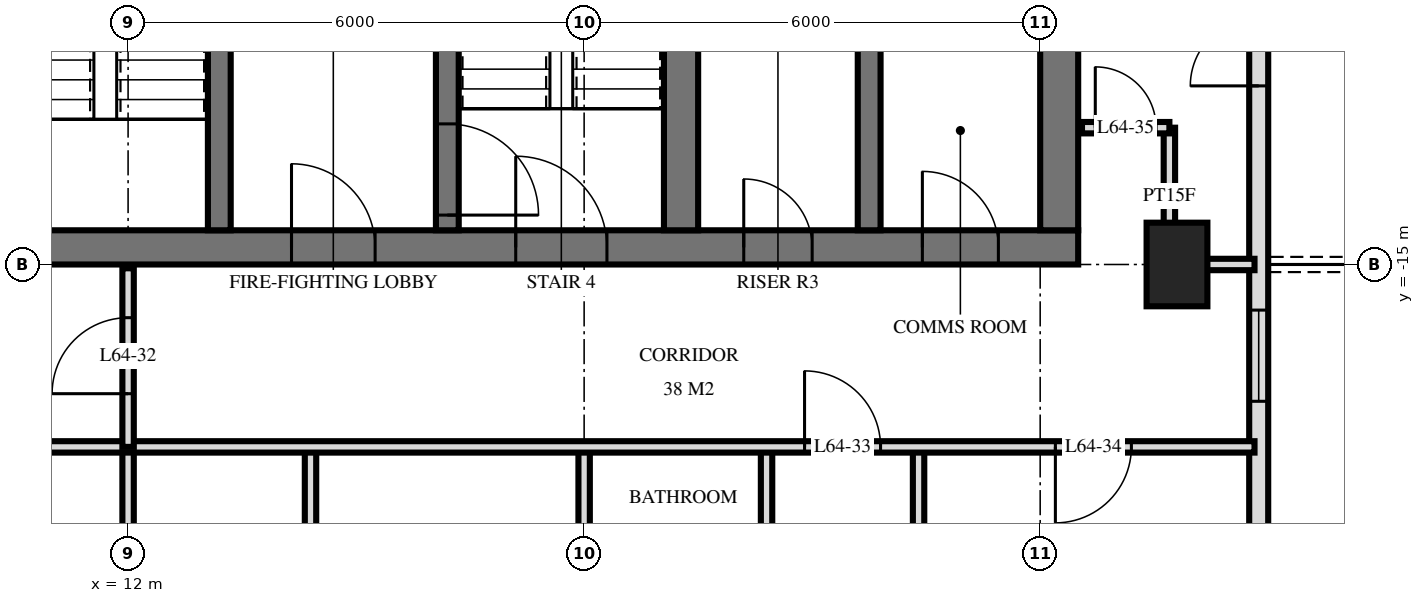
"""IFC4 building model, lengths in metres.
Left out: names, types, materials, properties, quantities, classifications, styles, units other than length and angle.
Written with IfcOpenShell. Run it as: python <this file> out.ifc"""

import sys

from ifc_helpers import new_model, si_unit, direction, frame, frame_2d, origin, origin_2d, place, context, subcontext, project, spatial, rectangle, extrude, element, fill, save


model = new_model("IFC4")
c1 = context("Model", 3, precision=1e-05, world=origin(), true_north=direction((0.0, 1.0)))
c2 = subcontext(c1, "Body", "Model", "MODEL_VIEW")
j1 = project(units=[si_unit("LENGTHUNIT", "METRE"), si_unit("PLANEANGLEUNIT", "RADIAN")], contexts=[c1])
p1 = place(None, origin())
s1 = spatial("IfcSite", under=j1, at=p1, CompositionType="ELEMENT")
p2 = place(p1, origin())
s2 = spatial("IfcBuilding", under=s1, at=p2, CompositionType="ELEMENT")
p3 = place(p2, frame((0.0, 0.0, 243.1)))
s3 = spatial("IfcBuildingStorey", under=s2, at=p3, CompositionType="ELEMENT", Elevation=243.1)
p4 = place(p3, frame((25.8, -15.0, 0.0), z_axis=(0.0, 0.0, 1.0), x_axis=(0.0, 1.0, 0.0)))
e1 = element("IfcColumn", 1, at=p4, inside=s3, PredefinedType="COLUMN", context=c2, shape_type="SweptSolid", body=[
    extrude(rectangle(XDim=1.1, YDim=0.8, at=origin_2d()), origin(), (0.0, 0.0, 1.0), 3.5),
])
p5 = place(p3, frame((10.0, -14.775, 0.0), z_axis=(0.0, 0.0, 1.0), x_axis=(1.0, 0.0, 0.0)))
e2 = element("IfcWall", 2, at=p5, inside=s3, PredefinedType="SHEAR", context=c2, shape_type="SweptSolid", body=[
    extrude(rectangle(XDim=14.5, YDim=0.45, at=frame_2d((7.25, 0.0))), origin(), (0.0, 0.0, 1.0), 3.5),
])
p6 = place(p5, frame((7.1, 0.0, 0.0)))
e3 = element("IfcOpeningElement", 3, at=p6, cuts=e2, PredefinedType="OPENING", context=c2, shape_type="SweptSolid", body=[
    extrude(rectangle(XDim=1.2, YDim=2.1, at=frame_2d((0.6, 1.05))), frame((0.0, 0.235, 0.0), z_axis=(0.0, -1.0, 0.0), x_axis=(1.0, 0.0, 0.0)), (0.0, 0.0, 1.0), 0.47),
])
p7 = place(p5, frame((4.15, 0.0, 0.0)))
e4 = element("IfcOpeningElement", 4, at=p7, cuts=e2, PredefinedType="OPENING", context=c2, shape_type="SweptSolid", body=[
    extrude(rectangle(XDim=1.1, YDim=2.1, at=frame_2d((0.55, 1.05))), frame((0.0, 0.235, 0.0), z_axis=(0.0, -1.0, 0.0), x_axis=(1.0, 0.0, 0.0)), (0.0, 0.0, 1.0), 0.47),
])
p8 = place(p5, frame((10.1, 0.0, 0.0)))
e5 = element("IfcOpeningElement", 5, at=p8, cuts=e2, PredefinedType="OPENING", context=c2, shape_type="SweptSolid", body=[
    extrude(rectangle(XDim=0.9, YDim=2.1, at=frame_2d((0.45, 1.05))), frame((0.0, 0.235, 0.0), z_axis=(0.0, -1.0, 0.0), x_axis=(1.0, 0.0, 0.0)), (0.0, 0.0, 1.0), 0.47),
])
p9 = place(p5, frame((12.45, 0.0, 0.0)))
e6 = element("IfcOpeningElement", 6, at=p9, cuts=e2, PredefinedType="OPENING", context=c2, shape_type="SweptSolid", body=[
    extrude(rectangle(XDim=1.0, YDim=2.1, at=frame_2d((0.5, 1.05))), frame((0.0, 0.235, 0.0), z_axis=(0.0, -1.0, 0.0), x_axis=(1.0, 0.0, 0.0)), (0.0, 0.0, 1.0), 0.47),
])
p10 = place(p3, frame((24.25, -14.55, 0.0), z_axis=(0.0, 0.0, 1.0), x_axis=(0.0, 1.0, 0.0)))
e7 = element("IfcWall", 7, at=p10, inside=s3, PredefinedType="SHEAR", context=c2, shape_type="SweptSolid", body=[
    extrude(rectangle(XDim=14.1, YDim=0.5, at=frame_2d((7.05, 0.0))), origin(), (0.0, 0.0, 1.0), 3.5),
])
p11 = place(p3, frame((13.2, -14.55, 0.0), z_axis=(0.0, 0.0, 1.0), x_axis=(0.0, 1.0, 0.0)))
e8 = element("IfcWall", 8, at=p11, inside=s3, PredefinedType="SHEAR", context=c2, shape_type="SweptSolid", body=[
    extrude(rectangle(XDim=5.4, YDim=0.3, at=frame_2d((2.7, 0.0))), origin(), (0.0, 0.0, 1.0), 3.5),
])
p12 = place(p11, frame((4.0, 0.0, 0.0)))
e9 = element("IfcOpeningElement", 9, at=p12, cuts=e8, PredefinedType="OPENING", context=c2, shape_type="SweptSolid", body=[
    extrude(rectangle(XDim=1.2, YDim=2.1, at=frame_2d((0.6, 1.05))), frame((0.0, 0.16, 0.0), z_axis=(0.0, -1.0, 0.0), x_axis=(1.0, 0.0, 0.0)), (0.0, 0.0, 1.0), 0.32),
])
p13 = place(p3, frame((16.2, -14.55, 0.0), z_axis=(0.0, 0.0, 1.0), x_axis=(0.0, 1.0, 0.0)))
e10 = element("IfcWall", 10, at=p13, inside=s3, PredefinedType="SHEAR", context=c2, shape_type="SweptSolid", body=[
    extrude(rectangle(XDim=5.4, YDim=0.3, at=frame_2d((2.7, 0.0))), origin(), (0.0, 0.0, 1.0), 3.5),
])
p14 = place(p13, frame((0.2, 0.0, 0.0)))
e11 = element("IfcOpeningElement", 11, at=p14, cuts=e10, PredefinedType="OPENING", context=c2, shape_type="SweptSolid", body=[
    extrude(rectangle(XDim=1.2, YDim=2.1, at=frame_2d((0.6, 1.05))), frame((0.0, 0.16, 0.0), z_axis=(0.0, -1.0, 0.0), x_axis=(1.0, 0.0, 0.0)), (0.0, 0.0, 1.0), 0.32),
])
p15 = place(p3, frame((19.275, -14.55, 0.0), z_axis=(0.0, 0.0, 1.0), x_axis=(0.0, 1.0, 0.0)))
e12 = element("IfcWall", 12, at=p15, inside=s3, PredefinedType="SHEAR", context=c2, shape_type="SweptSolid", body=[
    extrude(rectangle(XDim=5.4, YDim=0.45, at=frame_2d((2.7, 0.0))), origin(), (0.0, 0.0, 1.0), 3.5),
])
p16 = place(p3, frame((21.75, -14.55, 0.0), z_axis=(0.0, 0.0, 1.0), x_axis=(0.0, 1.0, 0.0)))
e13 = element("IfcWall", 13, at=p16, inside=s3, PredefinedType="SHEAR", context=c2, shape_type="SweptSolid", body=[
    extrude(rectangle(XDim=5.4, YDim=0.3, at=frame_2d((2.7, 0.0))), origin(), (0.0, 0.0, 1.0), 3.5),
])
p17 = place(p3, frame((26.875, -24.875, 0.0), z_axis=(0.0, 0.0, 1.0), x_axis=(0.0, 1.0, 0.0)))
e14 = element("IfcWall", 14, at=p17, inside=s3, PredefinedType="SOLIDWALL", context=c2, shape_type="SweptSolid", body=[
    extrude(rectangle(XDim=21.551, YDim=0.25, at=frame_2d((10.775, 0.0))), origin(), (0.0, 0.0, 1.0), 3.2),
])
p18 = place(p17, frame((0.575, 0.0, 0.0)))
e15 = element("IfcOpeningElement", 15, at=p18, cuts=e14, PredefinedType="OPENING", context=c2, shape_type="SweptSolid", body=[
    extrude(rectangle(XDim=1.8, YDim=2.4, at=frame_2d((0.9, 1.2))), frame((0.0, 0.135, 0.0), z_axis=(0.0, -1.0, 0.0), x_axis=(1.0, 0.0, 0.0)), (0.0, 0.0, 1.0), 0.27),
])
p19 = place(p17, frame((4.475, 0.0, 0.0)))
e16 = element("IfcOpeningElement", 16, at=p19, cuts=e14, PredefinedType="OPENING", context=c2, shape_type="SweptSolid", body=[
    extrude(rectangle(XDim=1.8, YDim=2.4, at=frame_2d((0.9, 1.2))), frame((0.0, 0.135, 0.0), z_axis=(0.0, -1.0, 0.0), x_axis=(1.0, 0.0, 0.0)), (0.0, 0.0, 1.0), 0.27),
])
p20 = place(p17, frame((8.075, 0.0, 0.9)))
e17 = element("IfcOpeningElement", 17, at=p20, cuts=e14, PredefinedType="OPENING", context=c2, shape_type="SweptSolid", body=[
    extrude(rectangle(XDim=1.2, YDim=1.5, at=frame_2d((0.6, 0.75))), frame((0.0, 0.135, 0.0), z_axis=(0.0, -1.0, 0.0), x_axis=(1.0, 0.0, 0.0)), (0.0, 0.0, 1.0), 0.27),
])
p21 = place(p17, frame((12.225, 0.0, 0.0)))
e18 = element("IfcOpeningElement", 18, at=p21, cuts=e14, PredefinedType="OPENING", context=c2, shape_type="SweptSolid", body=[
    extrude(rectangle(XDim=1.8, YDim=2.4, at=frame_2d((0.9, 1.2))), frame((0.0, 0.135, 0.0), z_axis=(0.0, -1.0, 0.0), x_axis=(1.0, 0.0, 0.0)), (0.0, 0.0, 1.0), 0.27),
])
p22 = place(p3, frame((25.7, -15.0, 0.0), z_axis=(0.0, 0.0, 1.0), x_axis=(0.0, 1.0, 0.0)))
e19 = element("IfcWall", 19, at=p22, inside=s3, PredefinedType="PARTITIONING", context=c2, shape_type="SweptSolid", body=[
    extrude(rectangle(XDim=1.8, YDim=0.15, at=frame_2d((0.9, 0.0))), origin(), (0.0, 0.0, 1.0), 3.22),
])
p23 = place(p3, frame((22.4, -21.6, 0.0), z_axis=(0.0, 0.0, 1.0), x_axis=(0.0, 1.0, 0.0)))
e20 = element("IfcWall", 20, at=p23, inside=s3, PredefinedType="PARTITIONING", context=c2, shape_type="SweptSolid", body=[
    extrude(rectangle(XDim=4.2, YDim=0.15, at=frame_2d((2.1, 0.0))), origin(), (0.0, 0.0, 1.0), 3.22),
])
p24 = place(p3, frame((20.4, -21.6, 0.0), z_axis=(0.0, 0.0, 1.0), x_axis=(0.0, 1.0, 0.0)))
e21 = element("IfcWall", 21, at=p24, inside=s3, PredefinedType="PARTITIONING", context=c2, shape_type="SweptSolid", body=[
    extrude(rectangle(XDim=4.2, YDim=0.15, at=frame_2d((2.1, 0.0))), origin(), (0.0, 0.0, 1.0), 3.22),
])
p25 = place(p24, frame((1.6, 0.0, 0.0)))
e22 = element("IfcOpeningElement", 22, at=p25, cuts=e21, PredefinedType="OPENING", context=c2, shape_type="SweptSolid", body=[
    extrude(rectangle(XDim=1.0, YDim=2.1, at=frame_2d((0.5, 1.05))), frame((0.0, 0.085, 0.0), z_axis=(0.0, -1.0, 0.0), x_axis=(1.0, 0.0, 0.0)), (0.0, 0.0, 1.0), 0.17),
])
for number, where, z_axis, x_axis in (
    (23, (18.0, -21.6, 0.0), (0.0, 0.0, 1.0), (0.0, 1.0, 0.0)),
    (24, (14.4, -21.6, 0.0), (0.0, 0.0, 1.0), (0.0, 1.0, 0.0)),
):
    element("IfcWall", number, at=place(p3, frame(where, z_axis=z_axis, x_axis=x_axis)), inside=s3, PredefinedType="PARTITIONING", context=c2, shape_type="SweptSolid", body=[
        extrude(rectangle(XDim=4.2, YDim=0.15, at=frame_2d((2.1, 0.0))), origin(), (0.0, 0.0, 1.0), 3.22),
    ])
p26 = place(p3, frame((12.0, -17.4, 0.0), z_axis=(0.0, 0.0, 1.0), x_axis=(0.0, 1.0, 0.0)))
e25 = element("IfcWall", 25, at=p26, inside=s3, PredefinedType="PARTITIONING", context=c2, shape_type="SweptSolid", body=[
    extrude(rectangle(XDim=2.35, YDim=0.15, at=frame_2d((1.175, 0.0))), origin(), (0.0, 0.0, 1.0), 3.22),
])
p27 = place(p26, frame((0.7, 0.0, 0.0)))
e26 = element("IfcOpeningElement", 26, at=p27, cuts=e25, PredefinedType="OPENING", context=c2, shape_type="SweptSolid", body=[
    extrude(rectangle(XDim=1.0, YDim=2.1, at=frame_2d((0.5, 1.05))), frame((0.0, 0.085, 0.0), z_axis=(0.0, -1.0, 0.0), x_axis=(1.0, 0.0, 0.0)), (0.0, 0.0, 1.0), 0.17),
])
p28 = place(p3, frame((12.0, -29.22, 0.0), z_axis=(0.0, 0.0, 1.0), x_axis=(0.0, 1.0, 0.0)))
e27 = element("IfcWall", 27, at=p28, inside=s3, PredefinedType="PARTITIONING", context=c2, shape_type="SweptSolid", body=[
    extrude(rectangle(XDim=11.82, YDim=0.15, at=frame_2d((5.91, 0.0))), origin(), (0.0, 0.0, 1.0), 3.22),
])
p29 = place(p3, frame((-26.82, -17.4, 0.0), z_axis=(0.0, 0.0, 1.0), x_axis=(1.0, 0.0, 0.0)))
e28 = element("IfcWall", 28, at=p29, inside=s3, PredefinedType="PARTITIONING", context=c2, shape_type="SweptSolid", body=[
    extrude(rectangle(XDim=53.64, YDim=0.15, at=frame_2d((26.82, 0.0))), origin(), (0.0, 0.0, 1.0), 3.22),
])
p30 = place(p29, frame((11.97, 0.0, 0.0)))
e29 = element("IfcOpeningElement", 29, at=p30, cuts=e28, PredefinedType="OPENING", context=c2, shape_type="SweptSolid", body=[
    extrude(rectangle(XDim=1.0, YDim=2.1, at=frame_2d((0.5, 1.05))), frame((0.0, 0.085, 0.0), z_axis=(0.0, -1.0, 0.0), x_axis=(1.0, 0.0, 0.0)), (0.0, 0.0, 1.0), 0.17),
])
p31 = place(p29, frame((3.92, 0.0, 0.0)))
e30 = element("IfcOpeningElement", 30, at=p31, cuts=e28, PredefinedType="OPENING", context=c2, shape_type="SweptSolid", body=[
    extrude(rectangle(XDim=1.0, YDim=2.1, at=frame_2d((0.5, 1.05))), frame((0.0, 0.085, 0.0), z_axis=(0.0, -1.0, 0.0), x_axis=(1.0, 0.0, 0.0)), (0.0, 0.0, 1.0), 0.17),
])
p32 = place(p29, frame((5.72, 0.0, 0.0)))
e31 = element("IfcOpeningElement", 31, at=p32, cuts=e28, PredefinedType="OPENING", context=c2, shape_type="SweptSolid", body=[
    extrude(rectangle(XDim=1.0, YDim=2.1, at=frame_2d((0.5, 1.05))), frame((0.0, 0.085, 0.0), z_axis=(0.0, -1.0, 0.0), x_axis=(1.0, 0.0, 0.0)), (0.0, 0.0, 1.0), 0.17),
])
p33 = place(p29, frame((47.72, 0.0, 0.0)))
e32 = element("IfcOpeningElement", 32, at=p33, cuts=e28, PredefinedType="OPENING", context=c2, shape_type="SweptSolid", body=[
    extrude(rectangle(XDim=1.0, YDim=2.1, at=frame_2d((0.5, 1.05))), frame((0.0, 0.085, 0.0), z_axis=(0.0, -1.0, 0.0), x_axis=(1.0, 0.0, 0.0)), (0.0, 0.0, 1.0), 0.17),
])
p34 = place(p29, frame((51.02, 0.0, 0.0)))
e33 = element("IfcOpeningElement", 33, at=p34, cuts=e28, PredefinedType="OPENING", context=c2, shape_type="SweptSolid", body=[
    extrude(rectangle(XDim=1.0, YDim=2.1, at=frame_2d((0.5, 1.05))), frame((0.0, 0.085, 0.0), z_axis=(0.0, -1.0, 0.0), x_axis=(1.0, 0.0, 0.0)), (0.0, 0.0, 1.0), 0.17),
])
p35 = place(p29, frame((17.32, 0.0, 0.0)))
e34 = element("IfcOpeningElement", 34, at=p35, cuts=e28, PredefinedType="OPENING", context=c2, shape_type="SweptSolid", body=[
    extrude(rectangle(XDim=1.0, YDim=2.1, at=frame_2d((0.5, 1.05))), frame((0.0, 0.085, 0.0), z_axis=(0.0, -1.0, 0.0), x_axis=(1.0, 0.0, 0.0)), (0.0, 0.0, 1.0), 0.17),
])
p36 = place(p29, frame((23.32, 0.0, 0.0)))
e35 = element("IfcOpeningElement", 35, at=p36, cuts=e28, PredefinedType="OPENING", context=c2, shape_type="SweptSolid", body=[
    extrude(rectangle(XDim=1.0, YDim=2.1, at=frame_2d((0.5, 1.05))), frame((0.0, 0.085, 0.0), z_axis=(0.0, -1.0, 0.0), x_axis=(1.0, 0.0, 0.0)), (0.0, 0.0, 1.0), 0.17),
])
p37 = place(p29, frame((29.32, 0.0, 0.0)))
e36 = element("IfcOpeningElement", 36, at=p37, cuts=e28, PredefinedType="OPENING", context=c2, shape_type="SweptSolid", body=[
    extrude(rectangle(XDim=1.0, YDim=2.1, at=frame_2d((0.5, 1.05))), frame((0.0, 0.085, 0.0), z_axis=(0.0, -1.0, 0.0), x_axis=(1.0, 0.0, 0.0)), (0.0, 0.0, 1.0), 0.17),
])
p38 = place(p29, frame((35.32, 0.0, 0.0)))
e37 = element("IfcOpeningElement", 37, at=p38, cuts=e28, PredefinedType="OPENING", context=c2, shape_type="SweptSolid", body=[
    extrude(rectangle(XDim=1.0, YDim=2.1, at=frame_2d((0.5, 1.05))), frame((0.0, 0.085, 0.0), z_axis=(0.0, -1.0, 0.0), x_axis=(1.0, 0.0, 0.0)), (0.0, 0.0, 1.0), 0.17),
])
p39 = place(p3, frame((25.7, -15.0, 0.0), z_axis=(0.0, 0.0, 1.0), x_axis=(1.0, 0.0, 0.0)))
e38 = element("IfcWall", 38, at=p39, inside=s3, PredefinedType="PARTITIONING", context=c2, shape_type="SweptSolid", body=[
    extrude(rectangle(XDim=1.12, YDim=0.15, at=frame_2d((0.56, 0.0))), origin(), (0.0, 0.0, 1.0), 3.22),
])
p40 = place(p3, frame((24.55, -13.2, 0.0), z_axis=(0.0, 0.0, 1.0), x_axis=(1.0, 0.0, 0.0)))
e39 = element("IfcWall", 39, at=p40, inside=s3, PredefinedType="PARTITIONING", context=c2, shape_type="SweptSolid", body=[
    extrude(rectangle(XDim=1.15, YDim=0.15, at=frame_2d((0.575, 0.0))), origin(), (0.0, 0.0, 1.0), 3.22),
])
p41 = place(p40, frame((0.175, 0.0, 0.0)))
e40 = element("IfcOpeningElement", 40, at=p41, cuts=e39, PredefinedType="OPENING", context=c2, shape_type="SweptSolid", body=[
    extrude(rectangle(XDim=0.8, YDim=2.1, at=frame_2d((0.4, 1.05))), frame((0.0, 0.085, 0.0), z_axis=(0.0, -1.0, 0.0), x_axis=(1.0, 0.0, 0.0)), (0.0, 0.0, 1.0), 0.17),
])
p42 = place(p20, origin())
e41 = element("IfcWindow", 41, at=p42, inside=s3, PartitioningType="SINGLE_PANEL", PredefinedType="WINDOW", context=c2, shape_type="SweptSolid", body=[
    extrude(rectangle(XDim=1.2, YDim=1.5, at=frame_2d((0.6, 0.75))), frame((0.0, 0.03, 0.0), z_axis=(0.0, -1.0, 0.0), x_axis=(1.0, 0.0, 0.0)), (0.0, 0.0, 1.0), 0.06),
])
fill(e17, e41)
p43 = place(p21, origin())
e42 = element("IfcDoor", 42, at=p43, inside=s3, OperationType="DOUBLE_DOOR_SINGLE_SWING", PredefinedType="DOOR", context=c2, shape_type="SweptSolid", body=[
    extrude(rectangle(XDim=1.8, YDim=2.4, at=frame_2d((0.9, 1.2))), frame((0.0, 0.025, 0.0), z_axis=(0.0, -1.0, 0.0), x_axis=(1.0, 0.0, 0.0)), (0.0, 0.0, 1.0), 0.05),
])
fill(e18, e42)
p44 = place(p6, origin())
e43 = element("IfcDoor", 43, at=p44, inside=s3, OperationType="SINGLE_SWING_RIGHT", PredefinedType="DOOR", context=c2, shape_type="SweptSolid", body=[
    extrude(rectangle(XDim=1.2, YDim=2.1, at=frame_2d((0.6, 1.05))), frame((0.0, 0.025, 0.0), z_axis=(0.0, -1.0, 0.0), x_axis=(1.0, 0.0, 0.0)), (0.0, 0.0, 1.0), 0.05),
])
fill(e3, e43)
p45 = place(p7, origin())
e44 = element("IfcDoor", 44, at=p45, inside=s3, OperationType="SINGLE_SWING_RIGHT", PredefinedType="DOOR", context=c2, shape_type="SweptSolid", body=[
    extrude(rectangle(XDim=1.1, YDim=2.1, at=frame_2d((0.55, 1.05))), frame((0.0, 0.025, 0.0), z_axis=(0.0, -1.0, 0.0), x_axis=(1.0, 0.0, 0.0)), (0.0, 0.0, 1.0), 0.05),
])
fill(e4, e44)
p46 = place(p8, origin())
e45 = element("IfcDoor", 45, at=p46, inside=s3, OperationType="SINGLE_SWING_RIGHT", PredefinedType="DOOR", context=c2, shape_type="SweptSolid", body=[
    extrude(rectangle(XDim=0.9, YDim=2.1, at=frame_2d((0.45, 1.05))), frame((0.0, 0.025, 0.0), z_axis=(0.0, -1.0, 0.0), x_axis=(1.0, 0.0, 0.0)), (0.0, 0.0, 1.0), 0.05),
])
fill(e5, e45)
p47 = place(p9, origin())
e46 = element("IfcDoor", 46, at=p47, inside=s3, OperationType="SINGLE_SWING_RIGHT", PredefinedType="DOOR", context=c2, shape_type="SweptSolid", body=[
    extrude(rectangle(XDim=1.0, YDim=2.1, at=frame_2d((0.5, 1.05))), frame((0.0, 0.025, 0.0), z_axis=(0.0, -1.0, 0.0), x_axis=(1.0, 0.0, 0.0)), (0.0, 0.0, 1.0), 0.05),
])
fill(e6, e46)
p48 = place(p14, frame((0.6, 0.0, 0.0), z_axis=(0.0, 0.0, 1.0), x_axis=(-1.0, 0.0, 0.0)))
e47 = element("IfcDoor", 47, at=p48, inside=s3, OperationType="SINGLE_SWING_LEFT", PredefinedType="DOOR", context=c2, shape_type="SweptSolid", body=[
    extrude(rectangle(XDim=1.2, YDim=2.1, at=frame_2d((0.0, 1.05))), frame((0.0, -0.025, 0.0), z_axis=(0.0, 1.0, 0.0), x_axis=(-1.0, 0.0, 0.0)), (0.0, 0.0, 1.0), 0.05),
])
fill(e11, e47)
p49 = place(p27, origin())
e48 = element("IfcDoor", 48, at=p49, inside=s3, OperationType="SINGLE_SWING_RIGHT", PredefinedType="DOOR", context=c2, shape_type="SweptSolid", body=[
    extrude(rectangle(XDim=1.0, YDim=2.1, at=frame_2d((0.5, 1.05))), frame((0.0, 0.025, 0.0), z_axis=(0.0, -1.0, 0.0), x_axis=(1.0, 0.0, 0.0)), (0.0, 0.0, 1.0), 0.05),
])
fill(e26, e48)
p50 = place(p33, origin())
e49 = element("IfcDoor", 49, at=p50, inside=s3, OperationType="SINGLE_SWING_RIGHT", PredefinedType="DOOR", context=c2, shape_type="SweptSolid", body=[
    extrude(rectangle(XDim=1.0, YDim=2.1, at=frame_2d((0.5, 1.05))), frame((0.0, 0.025, 0.0), z_axis=(0.0, -1.0, 0.0), x_axis=(1.0, 0.0, 0.0)), (0.0, 0.0, 1.0), 0.05),
])
fill(e32, e49)
p51 = place(p34, frame((0.5, 0.0, 0.0), z_axis=(0.0, 0.0, 1.0), x_axis=(-1.0, 0.0, 0.0)))
e50 = element("IfcDoor", 50, at=p51, inside=s3, OperationType="SINGLE_SWING_LEFT", PredefinedType="DOOR", context=c2, shape_type="SweptSolid", body=[
    extrude(rectangle(XDim=1.0, YDim=2.1, at=frame_2d((0.0, 1.05))), frame((0.0, -0.025, 0.0), z_axis=(0.0, 1.0, 0.0), x_axis=(-1.0, 0.0, 0.0)), (0.0, 0.0, 1.0), 0.05),
])
fill(e33, e50)
p52 = place(p41, origin())
e51 = element("IfcDoor", 51, at=p52, inside=s3, OperationType="SINGLE_SWING_RIGHT", PredefinedType="DOOR", context=c2, shape_type="SweptSolid", body=[
    extrude(rectangle(XDim=0.8, YDim=2.1, at=frame_2d((0.4, 1.05))), frame((0.0, 0.025, 0.0), z_axis=(0.0, -1.0, 0.0), x_axis=(1.0, 0.0, 0.0)), (0.0, 0.0, 1.0), 0.05),
])
fill(e40, e51)
save(model, sys.argv[1])
